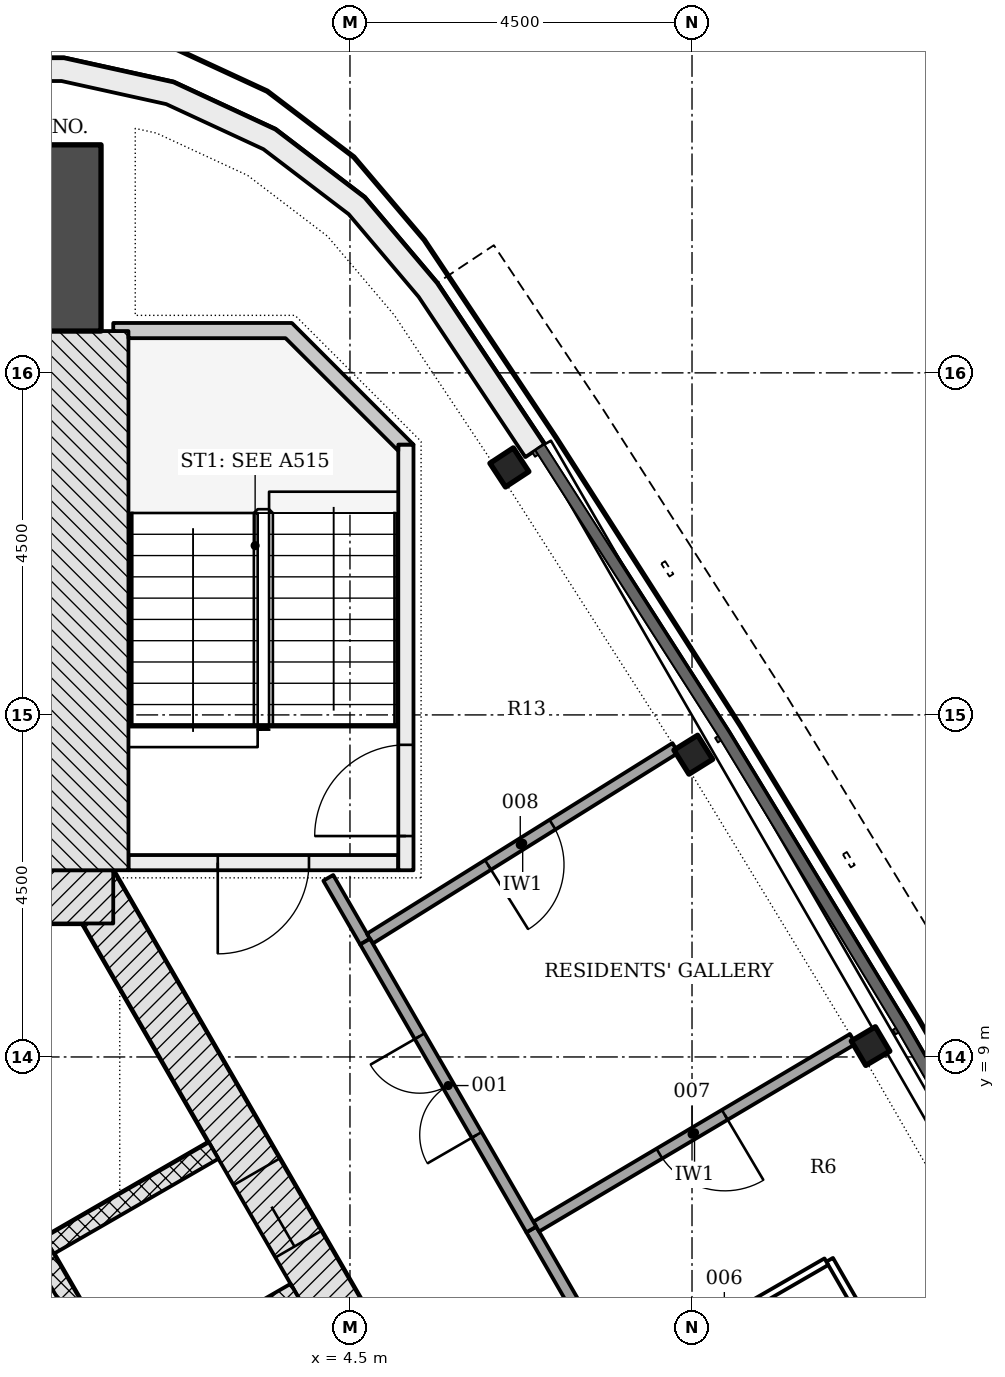
"""IFC4 building model, lengths in metres.
Left out: names, types, materials, properties, quantities, classifications, styles, units other than length and angle.
Written with IfcOpenShell. Run it as: python <this file> out.ifc"""

import sys

from ifc_helpers import new_model, si_unit, direction, frame, frame_2d, origin, origin_2d, place, context, subcontext, project, spatial, polyline, rectangle, i_section, outline, extrude, element, fill, save


model = new_model("IFC4")
c1 = context("Model", 3, precision=1e-05, world=origin(), true_north=direction((0.0, 1.0)))
c2 = subcontext(c1, "Body", "Model", "MODEL_VIEW")
j1 = project(units=[si_unit("LENGTHUNIT", "METRE"), si_unit("PLANEANGLEUNIT", "RADIAN")], contexts=[c1])
p1 = place(None, origin())
s1 = spatial("IfcSite", under=j1, at=p1, CompositionType="ELEMENT")
p2 = place(p1, origin())
s2 = spatial("IfcBuilding", under=s1, at=p2, CompositionType="ELEMENT")
p3 = place(p2, frame((0.0, 0.0, 240.0)))
s3 = spatial("IfcBuildingStorey", under=s2, at=p3, CompositionType="ELEMENT", Elevation=240.0)
p4 = place(p3, frame((10.311, -4.703, -0.2), z_axis=(0.0, 0.0, 1.0), x_axis=(-0.500001446645, 0.866024568562, 0.0)))
e1 = element("IfcWall", 1, at=p4, inside=s3, PredefinedType="SHEAR", context=c2, shape_type="SweptSolid", body=[
    extrude(rectangle(XDim=18.458, YDim=0.7, at=frame_2d((9.229, 0.0))), origin(), (0.0, 0.0, 1.0), 3.6),
])
p5 = place(p4, frame((4.379, 0.0, 0.2)))
e2 = element("IfcOpeningElement", 2, at=p5, cuts=e1, PredefinedType="OPENING", context=c2, shape_type="SweptSolid", body=[
    extrude(rectangle(XDim=1.1, YDim=2.1, at=frame_2d((0.55, 1.05))), frame((0.0, 0.36, 0.0), z_axis=(0.0, -1.0, 0.0), x_axis=(1.0, 0.0, 0.0)), (0.0, 0.0, 1.0), 0.72),
])
p6 = place(p4, frame((6.529, 0.0, 0.2)))
e3 = element("IfcOpeningElement", 3, at=p6, cuts=e1, PredefinedType="OPENING", context=c2, shape_type="SweptSolid", body=[
    extrude(rectangle(XDim=1.1, YDim=2.1, at=frame_2d((0.55, 1.05))), frame((0.0, 0.36, 0.0), z_axis=(0.0, -1.0, 0.0), x_axis=(1.0, 0.0, 0.0)), (0.0, 0.0, 1.0), 0.72),
])
p7 = place(p4, frame((8.679, 0.0, 0.2)))
e4 = element("IfcOpeningElement", 4, at=p7, cuts=e1, PredefinedType="OPENING", context=c2, shape_type="SweptSolid", body=[
    extrude(rectangle(XDim=1.1, YDim=2.1, at=frame_2d((0.55, 1.05))), frame((0.0, 0.36, 0.0), z_axis=(0.0, -1.0, 0.0), x_axis=(1.0, 0.0, 0.0)), (0.0, 0.0, 1.0), 0.72),
])
p8 = place(p4, frame((10.829, 0.0, 0.2)))
e5 = element("IfcOpeningElement", 5, at=p8, cuts=e1, PredefinedType="OPENING", context=c2, shape_type="SweptSolid", body=[
    extrude(rectangle(XDim=1.1, YDim=2.1, at=frame_2d((0.55, 1.05))), frame((0.0, 0.36, 0.0), z_axis=(0.0, -1.0, 0.0), x_axis=(1.0, 0.0, 0.0)), (0.0, 0.0, 1.0), 0.72),
])
p9 = place(p4, frame((12.979, 0.0, 0.2)))
e6 = element("IfcOpeningElement", 6, at=p9, cuts=e1, PredefinedType="OPENING", context=c2, shape_type="SweptSolid", body=[
    extrude(rectangle(XDim=1.1, YDim=2.1, at=frame_2d((0.55, 1.05))), frame((0.0, 0.36, 0.0), z_axis=(0.0, -1.0, 0.0), x_axis=(1.0, 0.0, 0.0)), (0.0, 0.0, 1.0), 0.72),
])
p10 = place(p3, frame((1.386, 11.106, -0.2), z_axis=(0.0, 0.0, 1.0), x_axis=(-1.0, 0.0, 0.0)))
e7 = element("IfcWall", 7, at=p10, inside=s3, PredefinedType="SHEAR", context=c2, shape_type="SweptSolid", body=[
    extrude(rectangle(XDim=2.771, YDim=0.7, at=frame_2d((1.386, 0.0))), origin(), (0.0, 0.0, 1.0), 3.6),
])
p11 = place(p3, frame((0.0, 19.775, -0.2), z_axis=(0.0, 0.0, 1.0), x_axis=(0.0, 1.0, 0.0)))
e8 = element("IfcColumn", 8, at=p11, inside=s3, PredefinedType="COLUMN", context=c2, shape_type="SweptSolid", body=[
    extrude(rectangle(XDim=2.45, YDim=2.45, at=origin_2d()), origin(), (0.0, 0.0, 1.0), 3.6),
])
for number, where, z_axis, x_axis in (
    (9, (11.349, 9.143, -0.2), (0.0, 0.0, 1.0), (-0.51, 0.86, 0.0)),
    (10, (9.017, 12.977, -0.2), (0.0, 0.0, 1.0), (-0.529, 0.848, 0.0)),
    (11, (6.597, 16.756, -0.2), (0.0, 0.0, 1.0), (-0.549, 0.836, 0.0)),
):
    element("IfcColumn", number, at=place(p3, frame(where, z_axis=z_axis, x_axis=x_axis)), inside=s3, PredefinedType="COLUMN", context=c2, shape_type="SweptSolid", body=[
        extrude(i_section(OverallWidth=0.373, OverallDepth=0.368, WebThickness=0.015, FlangeThickness=0.024, FilletRadius=0.015, at=origin_2d()), origin(), (0.0, 0.0, 1.0), 3.6),
    ])
p12 = place(p3, origin())
e12 = element("IfcWall", 12, at=p12, inside=s3, PredefinedType="NOTDEFINED", context=c2, shape_type="SweptSolid", body=[
    extrude(outline(polyline([(7.057, 17.058), (5.644, 19.18), (4.691, 20.307), (3.517, 21.201), (2.178, 21.822), (0.738, 22.139), (-0.738, 22.139), (-2.178, 21.822), (-3.517, 21.201), (-4.691, 20.307), (-5.644, 19.18), (-7.057, 17.058), (-6.807, 16.891), (-5.404, 19.0), (-4.483, 20.088), (-3.361, 20.943), (-2.082, 21.536), (-0.705, 21.839), (0.705, 21.839), (2.082, 21.536), (3.361, 20.943), (4.483, 20.088), (5.404, 19.0), (6.807, 16.891), (7.057, 17.058)])), origin(), (0.0, 0.0, 1.0), 3.3),
])
for number, where, z_axis, x_axis in (
    (13, (3.781, 5.907, -0.2), (0.0, 0.0, 1.0), (-0.866, -0.5, 0.0)),
    (14, (2.706, 7.769, -0.2), (0.0, 0.0, 1.0), (-0.866, -0.5, 0.0)),
):
    element("IfcWall", number, at=place(p3, frame(where, z_axis=z_axis, x_axis=x_axis)), inside=s3, PredefinedType="PARTITIONING", context=c2, shape_type="SweptSolid", body=[
        extrude(rectangle(XDim=2.5, YDim=0.25, at=frame_2d((1.25, 0.0))), origin(), (0.0, 0.0, 1.0), 3.6),
    ])
p13 = place(p3, frame((5.87, -2.961, 0.0), z_axis=(0.0, 0.0, 1.0), x_axis=(-0.50000615651, 0.866021849293, 0.0)))
e15 = element("IfcWall", 15, at=p13, inside=s3, PredefinedType="PARTITIONING", context=c2, shape_type="SweptSolid", body=[
    extrude(rectangle(XDim=11.0, YDim=0.25, at=frame_2d((5.5, 0.0))), origin(), (0.0, 0.0, 1.0), 3.4),
])
p14 = place(p3, frame((5.135, 11.556, -0.2), z_axis=(0.0, 0.0, 1.0), x_axis=(-1.0, 0.0, 0.0)))
e16 = element("IfcWall", 16, at=p14, inside=s3, PredefinedType="SHEAR", context=c2, shape_type="SweptSolid", body=[
    extrude(rectangle(XDim=3.55, YDim=0.2, at=frame_2d((1.775, 0.0))), origin(), (0.0, 0.0, 1.0), 3.6),
])
p15 = place(p14, frame((1.175, 0.0, 0.2)))
e17 = element("IfcOpeningElement", 17, at=p15, cuts=e16, PredefinedType="OPENING", context=c2, shape_type="SweptSolid", body=[
    extrude(rectangle(XDim=1.2, YDim=2.1, at=frame_2d((0.6, 1.05))), frame((0.0, 0.11, 0.0), z_axis=(0.0, -1.0, 0.0), x_axis=(1.0, 0.0, 0.0)), (0.0, 0.0, 1.0), 0.22),
])
p16 = place(p3, frame((5.236, 11.456, -0.2), z_axis=(0.0, 0.0, 1.0), x_axis=(0.0, 1.0, 0.0)))
e18 = element("IfcWall", 18, at=p16, inside=s3, PredefinedType="SHEAR", context=c2, shape_type="SweptSolid", body=[
    extrude(rectangle(XDim=5.6, YDim=0.2, at=frame_2d((2.8, 0.0))), origin(), (0.0, 0.0, 1.0), 3.6),
])
p17 = place(p16, frame((0.45, 0.0, 0.2)))
e19 = element("IfcOpeningElement", 19, at=p17, cuts=e18, PredefinedType="OPENING", context=c2, shape_type="SweptSolid", body=[
    extrude(rectangle(XDim=1.2, YDim=2.1, at=frame_2d((0.6, 1.05))), frame((0.0, 0.11, 0.0), z_axis=(0.0, -1.0, 0.0), x_axis=(1.0, 0.0, 0.0)), (0.0, 0.0, 1.0), 0.22),
])
p18 = place(p3, frame((0.943, 11.456, -0.2), z_axis=(0.0, 0.0, 1.0), x_axis=(0.0, 1.0, 0.0)))
e20 = element("IfcWall", 20, at=p18, inside=s3, PredefinedType="SHEAR", context=c2, shape_type="SweptSolid", body=[
    extrude(rectangle(XDim=7.094, YDim=1.286, at=frame_2d((3.547, 0.0))), origin(), (0.0, 0.0, 1.0), 3.6),
])
p19 = place(p3, frame((0.0, 0.0, -0.2)))
e21 = element("IfcWall", 21, at=p19, inside=s3, PredefinedType="SHEAR", context=c2, shape_type="SweptSolid", body=[
    extrude(outline(polyline([(5.336, 17.056), (3.736, 18.656), (1.385, 18.656), (1.385, 18.55), (1.586, 18.55), (1.586, 18.55), (1.586, 18.55), (1.586, 18.55), (1.586, 18.55), (1.586, 18.55), (1.586, 18.55), (1.586, 18.55), (1.586, 18.55), (1.586, 18.55), (1.586, 18.55), (1.586, 18.55), (1.586, 18.55), (1.586, 18.55), (1.586, 18.55), (1.586, 18.55), (1.586, 18.55), (1.586, 18.456), (3.653, 18.456), (5.135, 16.974), (5.135, 17.056), (5.135, 17.056), (5.135, 17.056), (5.135, 17.056), (5.135, 17.056), (5.135, 17.056), (5.135, 17.056), (5.135, 17.056), (5.135, 17.056), (5.135, 17.056), (5.135, 17.056), (5.135, 17.056), (5.135, 17.056), (5.135, 17.056), (5.135, 17.056), (5.135, 17.056), (5.135, 17.056), (5.336, 17.056)])), origin(), (0.0, 0.0, 1.0), 3.6),
])
p20 = place(p3, frame((15.836, -8.772, 0.0), z_axis=(0.0, 0.0, 1.0), x_axis=(-0.500001479768, 0.866024549438, 0.0)))
e22 = element("IfcWall", 22, at=p20, inside=s3, PredefinedType="PARTITIONING", context=c2, shape_type="SweptSolid", body=[
    extrude(rectangle(XDim=17.9, YDim=0.15, at=frame_2d((8.95, 0.0))), origin(), (0.0, 0.0, 1.0), 2.852),
])
p21 = place(p20, frame((2.973, 0.0, 0.0)))
e23 = element("IfcOpeningElement", 23, at=p21, cuts=e22, PredefinedType="OPENING", context=c2, shape_type="SweptSolid", body=[
    extrude(rectangle(XDim=1.0, YDim=2.1, at=frame_2d((0.5, 1.05))), frame((0.0, 0.085, 0.0), z_axis=(0.0, -1.0, 0.0), x_axis=(1.0, 0.0, 0.0)), (0.0, 0.0, 1.0), 0.17),
])
p22 = place(p20, frame((11.837, 0.0, 0.0)))
e24 = element("IfcOpeningElement", 24, at=p22, cuts=e22, PredefinedType="OPENING", context=c2, shape_type="SweptSolid", body=[
    extrude(rectangle(XDim=1.0, YDim=2.1, at=frame_2d((0.5, 1.05))), frame((0.0, 0.085, 0.0), z_axis=(0.0, -1.0, 0.0), x_axis=(1.0, 0.0, 0.0)), (0.0, 0.0, 1.0), 0.17),
])
p23 = place(p3, frame((4.699, 10.518, 0.0), z_axis=(0.0, 0.0, 1.0), x_axis=(-0.500042431503, 0.866000904559, 0.0)))
e25 = element("IfcWall", 25, at=p23, inside=s3, PredefinedType="PARTITIONING", context=c2, shape_type="SweptSolid", body=[
    extrude(rectangle(XDim=0.969, YDim=0.15, at=frame_2d((0.484, 0.0))), origin(), (0.0, 0.0, 1.0), 3.4),
])
p24 = place(p3, frame((11.116, 9.238, 0.0), z_axis=(0.0, 0.0, 1.0), x_axis=(-0.860234203322, -0.509899122803, 0.0)))
e26 = element("IfcWall", 26, at=p24, inside=s3, PredefinedType="PARTITIONING", context=c2, shape_type="SweptSolid", body=[
    extrude(rectangle(XDim=4.843, YDim=0.15, at=frame_2d((2.421, 0.0))), origin(), (0.0, 0.0, 1.0), 3.4),
])
p25 = place(p24, frame((1.959, 0.0, 0.0)))
e27 = element("IfcOpeningElement", 27, at=p25, cuts=e26, PredefinedType="OPENING", context=c2, shape_type="SweptSolid", body=[
    extrude(rectangle(XDim=1.0, YDim=2.1, at=frame_2d((0.5, 1.05))), frame((0.0, 0.085, 0.0), z_axis=(0.0, -1.0, 0.0), x_axis=(1.0, 0.0, 0.0)), (0.0, 0.0, 1.0), 0.17),
])
p26 = place(p3, frame((8.782, 13.066, 0.0), z_axis=(0.0, 0.0, 1.0), x_axis=(-0.848316605914, -0.529489316351, 0.0)))
e28 = element("IfcWall", 28, at=p26, inside=s3, PredefinedType="PARTITIONING", context=c2, shape_type="SweptSolid", body=[
    extrude(rectangle(XDim=4.738, YDim=0.15, at=frame_2d((2.369, 0.0))), origin(), (0.0, 0.0, 1.0), 3.4),
])
p27 = place(p26, frame((1.906, 0.0, 0.0)))
e29 = element("IfcOpeningElement", 29, at=p27, cuts=e28, PredefinedType="OPENING", context=c2, shape_type="SweptSolid", body=[
    extrude(rectangle(XDim=1.0, YDim=2.1, at=frame_2d((0.5, 1.05))), frame((0.0, 0.085, 0.0), z_axis=(0.0, -1.0, 0.0), x_axis=(1.0, 0.0, 0.0)), (0.0, 0.0, 1.0), 0.17),
])
p28 = place(p3, frame((6.886, 6.73, 0.0), z_axis=(0.0, 0.0, 1.0), x_axis=(-0.499999494409, 0.866025695687, 0.0)))
e30 = element("IfcWall", 30, at=p28, inside=s3, PredefinedType="PARTITIONING", context=c2, shape_type="SweptSolid", body=[
    extrude(rectangle(XDim=4.374, YDim=0.15, at=frame_2d((2.187, 0.0))), origin(), (0.0, 0.0, 1.0), 2.852),
])
p29 = place(p28, frame((1.437, 0.0, 0.0)))
e31 = element("IfcOpeningElement", 31, at=p29, cuts=e30, PredefinedType="OPENING", context=c2, shape_type="SweptSolid", body=[
    extrude(rectangle(XDim=1.5, YDim=2.1, at=frame_2d((0.75, 1.05))), frame((0.0, 0.085, 0.0), z_axis=(0.0, -1.0, 0.0), x_axis=(1.0, 0.0, 0.0)), (0.0, 0.0, 1.0), 0.17),
])
p30 = place(p3, frame((11.823, 4.578, 0.0), z_axis=(0.0, 0.0, 1.0), x_axis=(-0.499990325971, 0.866030989016, 0.0)))
e32 = element("IfcWall", 32, at=p30, inside=s3, PredefinedType="PARTITIONING", context=c2, shape_type="SweptSolid", body=[
    extrude(rectangle(XDim=2.025, YDim=0.1, at=frame_2d((1.012, 0.0))), origin(), (0.0, 0.0, 1.0), 3.4),
])
p31 = place(p3, frame((10.768, 6.306, 0.0), z_axis=(0.0, 0.0, 1.0), x_axis=(-0.866050731258, -0.499956128963, 0.0)))
e33 = element("IfcWall", 33, at=p31, inside=s3, PredefinedType="PARTITIONING", context=c2, shape_type="SweptSolid", body=[
    extrude(rectangle(XDim=3.075, YDim=0.1, at=frame_2d((1.538, 0.0))), origin(), (0.0, 0.0, 1.0), 3.4),
])
p32 = place(p31, frame((1.05, 0.0, 0.0)))
e34 = element("IfcOpeningElement", 34, at=p32, cuts=e33, PredefinedType="OPENING", context=c2, shape_type="SweptSolid", body=[
    extrude(rectangle(XDim=1.0, YDim=2.1, at=frame_2d((0.5, 1.05))), frame((0.0, 0.06, 0.0), z_axis=(0.0, -1.0, 0.0), x_axis=(1.0, 0.0, 0.0)), (0.0, 0.0, 1.0), 0.12),
])
p33 = place(p9, origin())
e35 = element("IfcDoor", 35, at=p33, inside=s3, OperationType="DOUBLE_DOOR_SLIDING", PredefinedType="DOOR", context=c2, shape_type="SweptSolid", body=[
    extrude(rectangle(XDim=1.1, YDim=2.1, at=frame_2d((0.55, 1.05))), frame((0.0, 0.025, 0.0), z_axis=(0.0, -1.0, 0.0), x_axis=(1.0, 0.0, 0.0)), (0.0, 0.0, 1.0), 0.05),
])
fill(e6, e35)
p34 = place(p15, origin())
e36 = element("IfcDoor", 36, at=p34, inside=s3, OperationType="SINGLE_SWING_RIGHT", PredefinedType="DOOR", context=c2, shape_type="SweptSolid", body=[
    extrude(rectangle(XDim=1.2, YDim=2.1, at=frame_2d((0.6, 1.05))), frame((0.0, 0.025, 0.0), z_axis=(0.0, -1.0, 0.0), x_axis=(1.0, 0.0, 0.0)), (0.0, 0.0, 1.0), 0.05),
])
fill(e17, e36)
p35 = place(p17, origin())
e37 = element("IfcDoor", 37, at=p35, inside=s3, OperationType="SINGLE_SWING_LEFT", PredefinedType="DOOR", context=c2, shape_type="SweptSolid", body=[
    extrude(rectangle(XDim=1.2, YDim=2.1, at=frame_2d((0.6, 1.05))), frame((0.0, 0.025, 0.0), z_axis=(0.0, -1.0, 0.0), x_axis=(1.0, 0.0, 0.0)), (0.0, 0.0, 1.0), 0.05),
])
fill(e19, e37)
p36 = place(p29, origin())
e38 = element("IfcDoor", 38, at=p36, inside=s3, OperationType="DOUBLE_DOOR_SINGLE_SWING", PredefinedType="DOOR", context=c2, shape_type="SweptSolid", body=[
    extrude(rectangle(XDim=1.5, YDim=2.1, at=frame_2d((0.75, 1.05))), frame((0.0, 0.025, 0.0), z_axis=(0.0, -1.0, 0.0), x_axis=(1.0, 0.0, 0.0)), (0.0, 0.0, 1.0), 0.05),
])
fill(e31, e38)
p37 = place(p25, origin())
e39 = element("IfcDoor", 39, at=p37, inside=s3, OperationType="SINGLE_SWING_LEFT", PredefinedType="DOOR", context=c2, shape_type="SweptSolid", body=[
    extrude(rectangle(XDim=1.0, YDim=2.1, at=frame_2d((0.5, 1.05))), frame((0.0, 0.025, 0.0), z_axis=(0.0, -1.0, 0.0), x_axis=(1.0, 0.0, 0.0)), (0.0, 0.0, 1.0), 0.05),
])
fill(e27, e39)
p38 = place(p27, origin())
e40 = element("IfcDoor", 40, at=p38, inside=s3, OperationType="SINGLE_SWING_RIGHT", PredefinedType="DOOR", context=c2, shape_type="SweptSolid", body=[
    extrude(rectangle(XDim=1.0, YDim=2.1, at=frame_2d((0.5, 1.05))), frame((0.0, 0.025, 0.0), z_axis=(0.0, -1.0, 0.0), x_axis=(1.0, 0.0, 0.0)), (0.0, 0.0, 1.0), 0.05),
])
fill(e29, e40)
save(model, sys.argv[1])
